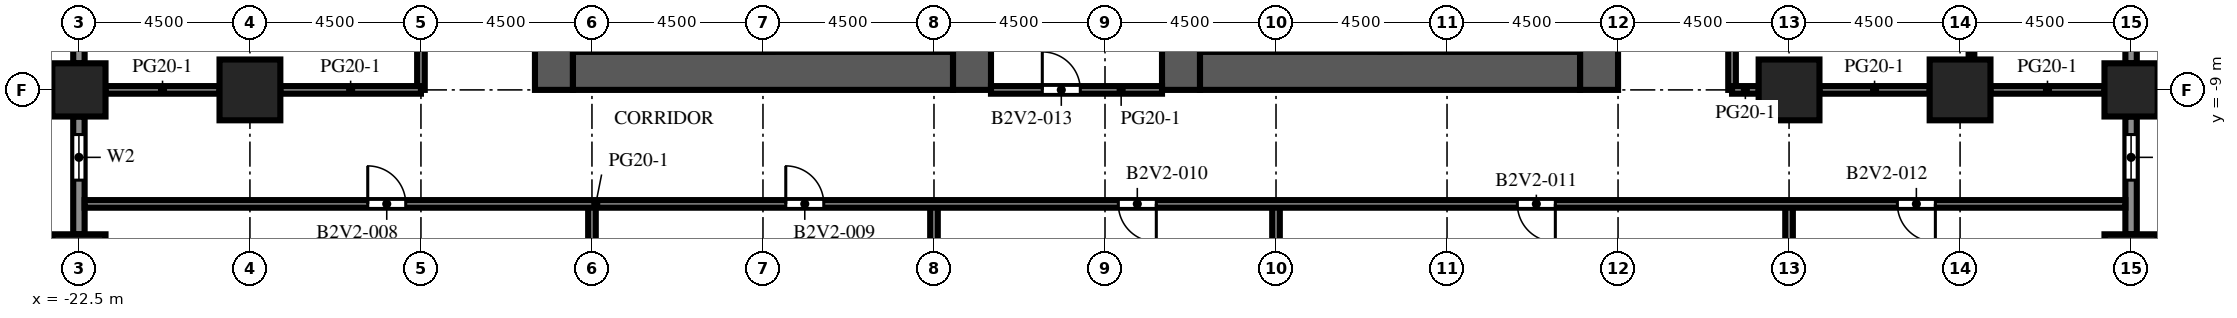
"""IFC4 building model, lengths in metres.
Left out: names, types, materials, properties, quantities, classifications, styles, units other than length and angle.
Written with IfcOpenShell. Run it as: python <this file> out.ifc"""

import sys

from ifc_helpers import new_model, si_unit, direction, frame, frame_2d, origin, origin_2d, place, context, subcontext, project, spatial, rectangle, extrude, element, fill, save


model = new_model("IFC4")
c1 = context("Model", 3, precision=1e-05, world=origin(), true_north=direction((0.0, 1.0)))
c2 = subcontext(c1, "Body", "Model", "MODEL_VIEW")
j1 = project(units=[si_unit("LENGTHUNIT", "METRE"), si_unit("PLANEANGLEUNIT", "RADIAN")], contexts=[c1])
p1 = place(None, origin())
s1 = spatial("IfcSite", under=j1, at=p1, CompositionType="ELEMENT")
p2 = place(p1, origin())
s2 = spatial("IfcBuilding", under=s1, at=p2, CompositionType="ELEMENT")
p3 = place(p2, frame((0.0, 0.0, 62.4)))
s3 = spatial("IfcBuildingStorey", under=s2, at=p3, CompositionType="ELEMENT", Elevation=62.4)
for number, where, z_axis, x_axis in (
    (1, (-22.5, -13.5, 0.0), (0.0, 0.0, 1.0), (1.0, 0.0, 0.0)),
    (2, (-22.5, -9.0, 0.0), (0.0, 0.0, 1.0), (1.0, 0.0, 0.0)),
    (3, (31.5, -13.5, 0.0), (0.0, 0.0, 1.0), (1.0, 0.0, 0.0)),
    (4, (31.5, -9.0, 0.0), (0.0, 0.0, 1.0), (1.0, 0.0, 0.0)),
):
    element("IfcColumn", number, at=place(p3, frame(where, z_axis=z_axis, x_axis=x_axis)), inside=s3, PredefinedType="COLUMN", context=c2, shape_type="SweptSolid", body=[
        extrude(rectangle(XDim=1.4, YDim=1.4, at=origin_2d()), origin(), (0.0, 0.0, 1.0), 4.1),
    ])
for number, where, z_axis, x_axis in (
    (5, (-18.0, -9.0, 0.0), (0.0, 0.0, 1.0), (1.0, 0.0, 0.0)),
    (6, (22.5, -9.0, 0.0), (0.0, 0.0, 1.0), (1.0, 0.0, 0.0)),
    (7, (27.0, -9.0, 0.0), (0.0, 0.0, 1.0), (1.0, 0.0, 0.0)),
):
    element("IfcColumn", number, at=place(p3, frame(where, z_axis=z_axis, x_axis=x_axis)), inside=s3, PredefinedType="COLUMN", context=c2, shape_type="SweptSolid", body=[
        extrude(rectangle(XDim=1.6, YDim=1.6, at=origin_2d()), origin(), (0.0, 0.0, 1.0), 4.1),
    ])
p4 = place(p3, frame((-10.0, -9.0, 0.0), z_axis=(0.0, 0.0, 1.0), x_axis=(0.0, 1.0, 0.0)))
e8 = element("IfcWall", 8, at=p4, inside=s3, PredefinedType="SHEAR", context=c2, shape_type="SweptSolid", body=[
    extrude(rectangle(XDim=27.5, YDim=1.0, at=frame_2d((13.75, 0.0))), origin(), (0.0, 0.0, 1.0), 4.1),
])
p5 = place(p4, frame((12.55, 0.0, 0.0)))
e9 = element("IfcOpeningElement", 9, at=p5, cuts=e8, PredefinedType="OPENING", context=c2, shape_type="SweptSolid", body=[
    extrude(rectangle(XDim=2.4, YDim=2.4, at=frame_2d((1.2, 1.2))), frame((0.0, 0.51, 0.0), z_axis=(0.0, -1.0, 0.0), x_axis=(1.0, 0.0, 0.0)), (0.0, 0.0, 1.0), 1.02),
])
p6 = place(p4, frame((6.825, 0.0, 0.0)))
e10 = element("IfcOpeningElement", 10, at=p6, cuts=e8, PredefinedType="OPENING", context=c2, shape_type="SweptSolid", body=[
    extrude(rectangle(XDim=1.2, YDim=2.1, at=frame_2d((0.6, 1.05))), frame((0.0, 0.51, 0.0), z_axis=(0.0, -1.0, 0.0), x_axis=(1.0, 0.0, 0.0)), (0.0, 0.0, 1.0), 1.02),
])
p7 = place(p4, frame((19.475, 0.0, 0.0)))
e11 = element("IfcOpeningElement", 11, at=p7, cuts=e8, PredefinedType="OPENING", context=c2, shape_type="SweptSolid", body=[
    extrude(rectangle(XDim=1.2, YDim=2.1, at=frame_2d((0.6, 1.05))), frame((0.0, 0.51, 0.0), z_axis=(0.0, -1.0, 0.0), x_axis=(1.0, 0.0, 0.0)), (0.0, 0.0, 1.0), 1.02),
])
p8 = place(p3, frame((1.0, -9.0, 0.0), z_axis=(0.0, 0.0, 1.0), x_axis=(0.0, 1.0, 0.0)))
e12 = element("IfcWall", 12, at=p8, inside=s3, PredefinedType="SHEAR", context=c2, shape_type="SweptSolid", body=[
    extrude(rectangle(XDim=27.5, YDim=1.0, at=frame_2d((13.75, 0.0))), origin(), (0.0, 0.0, 1.0), 4.1),
])
p9 = place(p8, frame((12.55, 0.0, 0.0)))
e13 = element("IfcOpeningElement", 13, at=p9, cuts=e12, PredefinedType="OPENING", context=c2, shape_type="SweptSolid", body=[
    extrude(rectangle(XDim=2.4, YDim=2.4, at=frame_2d((1.2, 1.2))), frame((0.0, 0.51, 0.0), z_axis=(0.0, -1.0, 0.0), x_axis=(1.0, 0.0, 0.0)), (0.0, 0.0, 1.0), 1.02),
])
p10 = place(p8, frame((5.55, 0.0, 0.0)))
e14 = element("IfcOpeningElement", 14, at=p10, cuts=e12, PredefinedType="OPENING", context=c2, shape_type="SweptSolid", body=[
    extrude(rectangle(XDim=0.905, YDim=2.1, at=frame_2d((0.453, 1.05))), frame((0.0, 0.51, 0.0), z_axis=(0.0, -1.0, 0.0), x_axis=(1.0, 0.0, 0.0)), (0.0, 0.0, 1.0), 1.02),
])
p11 = place(p8, frame((23.363, 0.0, 0.0)))
e15 = element("IfcOpeningElement", 15, at=p11, cuts=e12, PredefinedType="OPENING", context=c2, shape_type="SweptSolid", body=[
    extrude(rectangle(XDim=1.2, YDim=2.1, at=frame_2d((0.6, 1.05))), frame((0.0, 0.51, 0.0), z_axis=(0.0, -1.0, 0.0), x_axis=(1.0, 0.0, 0.0)), (0.0, 0.0, 1.0), 1.02),
])
p12 = place(p3, frame((-9.5, -8.5, 0.0), z_axis=(0.0, 0.0, 1.0), x_axis=(1.0, 0.0, 0.0)))
e16 = element("IfcWall", 16, at=p12, inside=s3, PredefinedType="SHEAR", context=c2, shape_type="SweptSolid", body=[
    extrude(rectangle(XDim=10.0, YDim=1.0, at=frame_2d((5.0, 0.0))), origin(), (0.0, 0.0, 1.0), 4.1),
])
p13 = place(p3, frame((6.5, -9.0, 0.0), z_axis=(0.0, 0.0, 1.0), x_axis=(0.0, 1.0, 0.0)))
e17 = element("IfcWall", 17, at=p13, inside=s3, PredefinedType="SHEAR", context=c2, shape_type="SweptSolid", body=[
    extrude(rectangle(XDim=27.5, YDim=1.0, at=frame_2d((13.75, 0.0))), origin(), (0.0, 0.0, 1.0), 4.1),
])
p14 = place(p13, frame((12.55, 0.0, 0.0)))
e18 = element("IfcOpeningElement", 18, at=p14, cuts=e17, PredefinedType="OPENING", context=c2, shape_type="SweptSolid", body=[
    extrude(rectangle(XDim=2.4, YDim=2.4, at=frame_2d((1.2, 1.2))), frame((0.0, 0.51, 0.0), z_axis=(0.0, -1.0, 0.0), x_axis=(1.0, 0.0, 0.0)), (0.0, 0.0, 1.0), 1.02),
])
p15 = place(p13, frame((5.55, 0.0, 0.0)))
e19 = element("IfcOpeningElement", 19, at=p15, cuts=e17, PredefinedType="OPENING", context=c2, shape_type="SweptSolid", body=[
    extrude(rectangle(XDim=0.905, YDim=2.1, at=frame_2d((0.453, 1.05))), frame((0.0, 0.51, 0.0), z_axis=(0.0, -1.0, 0.0), x_axis=(1.0, 0.0, 0.0)), (0.0, 0.0, 1.0), 1.02),
])
p16 = place(p13, frame((23.363, 0.0, 0.0)))
e20 = element("IfcOpeningElement", 20, at=p16, cuts=e17, PredefinedType="OPENING", context=c2, shape_type="SweptSolid", body=[
    extrude(rectangle(XDim=1.2, YDim=2.1, at=frame_2d((0.6, 1.05))), frame((0.0, 0.51, 0.0), z_axis=(0.0, -1.0, 0.0), x_axis=(1.0, 0.0, 0.0)), (0.0, 0.0, 1.0), 1.02),
])
p17 = place(p3, frame((17.5, -9.0, 0.0), z_axis=(0.0, 0.0, 1.0), x_axis=(0.0, 1.0, 0.0)))
e21 = element("IfcWall", 21, at=p17, inside=s3, PredefinedType="SHEAR", context=c2, shape_type="SweptSolid", body=[
    extrude(rectangle(XDim=27.5, YDim=1.0, at=frame_2d((13.75, 0.0))), origin(), (0.0, 0.0, 1.0), 4.1),
])
p18 = place(p17, frame((12.55, 0.0, 0.0)))
e22 = element("IfcOpeningElement", 22, at=p18, cuts=e21, PredefinedType="OPENING", context=c2, shape_type="SweptSolid", body=[
    extrude(rectangle(XDim=2.4, YDim=2.4, at=frame_2d((1.2, 1.2))), frame((0.0, 0.51, 0.0), z_axis=(0.0, -1.0, 0.0), x_axis=(1.0, 0.0, 0.0)), (0.0, 0.0, 1.0), 1.02),
])
p19 = place(p17, frame((6.825, 0.0, 0.0)))
e23 = element("IfcOpeningElement", 23, at=p19, cuts=e21, PredefinedType="OPENING", context=c2, shape_type="SweptSolid", body=[
    extrude(rectangle(XDim=1.2, YDim=2.1, at=frame_2d((0.6, 1.05))), frame((0.0, 0.51, 0.0), z_axis=(0.0, -1.0, 0.0), x_axis=(1.0, 0.0, 0.0)), (0.0, 0.0, 1.0), 1.02),
])
p20 = place(p17, frame((19.475, 0.0, 0.0)))
e24 = element("IfcOpeningElement", 24, at=p20, cuts=e21, PredefinedType="OPENING", context=c2, shape_type="SweptSolid", body=[
    extrude(rectangle(XDim=1.2, YDim=2.1, at=frame_2d((0.6, 1.05))), frame((0.0, 0.51, 0.0), z_axis=(0.0, -1.0, 0.0), x_axis=(1.0, 0.0, 0.0)), (0.0, 0.0, 1.0), 1.02),
])
p21 = place(p3, frame((7.0, -8.5, 0.0), z_axis=(0.0, 0.0, 1.0), x_axis=(1.0, 0.0, 0.0)))
e25 = element("IfcWall", 25, at=p21, inside=s3, PredefinedType="SHEAR", context=c2, shape_type="SweptSolid", body=[
    extrude(rectangle(XDim=10.0, YDim=1.0, at=frame_2d((5.0, 0.0))), origin(), (0.0, 0.0, 1.0), 4.1),
])
p22 = place(p3, frame((31.5, -9.7, 0.0), z_axis=(0.0, 0.0, 1.0), x_axis=(0.0, -1.0, 0.0)))
e26 = element("IfcWall", 26, at=p22, inside=s3, PredefinedType="SOLIDWALL", context=c2, shape_type="SweptSolid", body=[
    extrude(rectangle(XDim=3.1, YDim=0.3, at=frame_2d((1.55, 0.0))), origin(), (0.0, 0.0, 1.0), 2.75),
])
p23 = place(p22, frame((0.475, 0.0, 0.8)))
e27 = element("IfcOpeningElement", 27, at=p23, cuts=e26, PredefinedType="OPENING", context=c2, shape_type="SweptSolid", body=[
    extrude(rectangle(XDim=1.2, YDim=1.7, at=frame_2d((0.6, 0.85))), frame((0.0, 0.16, 0.0), z_axis=(0.0, -1.0, 0.0), x_axis=(1.0, 0.0, 0.0)), (0.0, 0.0, 1.0), 0.32),
])
p24 = place(p3, frame((31.5, -5.2, 0.0), z_axis=(0.0, 0.0, 1.0), x_axis=(0.0, -1.0, 0.0)))
e28 = element("IfcWall", 28, at=p24, inside=s3, PredefinedType="SOLIDWALL", context=c2, shape_type="SweptSolid", body=[
    extrude(rectangle(XDim=3.1, YDim=0.3, at=frame_2d((1.55, 0.0))), origin(), (0.0, 0.0, 1.0), 2.75),
])
p25 = place(p24, frame((0.35, 0.0, 0.8)))
e29 = element("IfcOpeningElement", 29, at=p25, cuts=e28, PredefinedType="OPENING", context=c2, shape_type="SweptSolid", body=[
    extrude(rectangle(XDim=2.4, YDim=1.7, at=frame_2d((1.2, 0.85))), frame((0.0, 0.16, 0.0), z_axis=(0.0, -1.0, 0.0), x_axis=(1.0, 0.0, 0.0)), (0.0, 0.0, 1.0), 0.32),
])
p26 = place(p3, frame((-22.5, -8.3, 0.0), z_axis=(0.0, 0.0, 1.0), x_axis=(0.0, 1.0, 0.0)))
e30 = element("IfcWall", 30, at=p26, inside=s3, PredefinedType="SOLIDWALL", context=c2, shape_type="SweptSolid", body=[
    extrude(rectangle(XDim=3.1, YDim=0.3, at=frame_2d((1.55, 0.0))), origin(), (0.0, 0.0, 1.0), 2.75),
])
p27 = place(p26, frame((0.35, 0.0, 0.8)))
e31 = element("IfcOpeningElement", 31, at=p27, cuts=e30, PredefinedType="OPENING", context=c2, shape_type="SweptSolid", body=[
    extrude(rectangle(XDim=2.4, YDim=1.7, at=frame_2d((1.2, 0.85))), frame((0.0, 0.16, 0.0), z_axis=(0.0, -1.0, 0.0), x_axis=(1.0, 0.0, 0.0)), (0.0, 0.0, 1.0), 0.32),
])
p28 = place(p3, frame((-22.5, -12.8, 0.0), z_axis=(0.0, 0.0, 1.0), x_axis=(0.0, 1.0, 0.0)))
e32 = element("IfcWall", 32, at=p28, inside=s3, PredefinedType="SOLIDWALL", context=c2, shape_type="SweptSolid", body=[
    extrude(rectangle(XDim=3.1, YDim=0.3, at=frame_2d((1.55, 0.0))), origin(), (0.0, 0.0, 1.0), 2.75),
])
p29 = place(p28, frame((1.425, 0.0, 0.8)))
e33 = element("IfcOpeningElement", 33, at=p29, cuts=e32, PredefinedType="OPENING", context=c2, shape_type="SweptSolid", body=[
    extrude(rectangle(XDim=1.2, YDim=1.7, at=frame_2d((0.6, 0.85))), frame((0.0, 0.16, 0.0), z_axis=(0.0, -1.0, 0.0), x_axis=(1.0, 0.0, 0.0)), (0.0, 0.0, 1.0), 0.32),
])
p30 = place(p3, frame((-13.5, -9.0, 0.0), z_axis=(0.0, 0.0, 1.0), x_axis=(0.0, 1.0, 0.0)))
e34 = element("IfcWall", 34, at=p30, inside=s3, PredefinedType="PARTITIONING", context=c2, shape_type="SweptSolid", body=[
    extrude(rectangle(XDim=27.5, YDim=0.2, at=frame_2d((13.75, 0.0))), origin(), (0.0, 0.0, 1.0), 3.65),
])
p31 = place(p30, frame((4.85, 0.0, 0.0)))
e35 = element("IfcOpeningElement", 35, at=p31, cuts=e34, PredefinedType="OPENING", context=c2, shape_type="SweptSolid", body=[
    extrude(rectangle(XDim=1.0, YDim=2.1, at=frame_2d((0.5, 1.05))), frame((0.0, 0.11, 0.0), z_axis=(0.0, -1.0, 0.0), x_axis=(1.0, 0.0, 0.0)), (0.0, 0.0, 1.0), 0.22),
])
p32 = place(p30, frame((16.35, 0.0, 0.0)))
e36 = element("IfcOpeningElement", 36, at=p32, cuts=e34, PredefinedType="OPENING", context=c2, shape_type="SweptSolid", body=[
    extrude(rectangle(XDim=1.0, YDim=2.1, at=frame_2d((0.5, 1.05))), frame((0.0, 0.11, 0.0), z_axis=(0.0, -1.0, 0.0), x_axis=(1.0, 0.0, 0.0)), (0.0, 0.0, 1.0), 0.22),
])
for number, where, z_axis, x_axis in (
    (37, (-9.0, -17.2, 0.0), (0.0, 0.0, 1.0), (0.0, 1.0, 0.0)),
    (38, (0.0, -17.2, 0.0), (0.0, 0.0, 1.0), (0.0, 1.0, 0.0)),
    (39, (9.0, -17.2, 0.0), (0.0, 0.0, 1.0), (0.0, 1.0, 0.0)),
):
    element("IfcWall", number, at=place(p3, frame(where, z_axis=z_axis, x_axis=x_axis)), inside=s3, PredefinedType="PARTITIONING", context=c2, shape_type="SweptSolid", body=[
        extrude(rectangle(XDim=5.2, YDim=0.2, at=frame_2d((2.6, 0.0))), origin(), (0.0, 0.0, 1.0), 3.65),
    ])
p33 = place(p3, frame((21.0, 18.5, 0.0), z_axis=(0.0, 0.0, 1.0), x_axis=(0.0, -1.0, 0.0)))
e40 = element("IfcWall", 40, at=p33, inside=s3, PredefinedType="PARTITIONING", context=c2, shape_type="SweptSolid", body=[
    extrude(rectangle(XDim=27.5, YDim=0.2, at=frame_2d((13.75, 0.0))), origin(), (0.0, 0.0, 1.0), 3.65),
])
p34 = place(p33, frame((19.4, 0.0, 0.0)))
e41 = element("IfcOpeningElement", 41, at=p34, cuts=e40, PredefinedType="OPENING", context=c2, shape_type="SweptSolid", body=[
    extrude(rectangle(XDim=1.0, YDim=2.1, at=frame_2d((0.5, 1.05))), frame((0.0, 0.11, 0.0), z_axis=(0.0, -1.0, 0.0), x_axis=(1.0, 0.0, 0.0)), (0.0, 0.0, 1.0), 0.22),
])
p35 = place(p33, frame((7.65, 0.0, 0.0)))
e42 = element("IfcOpeningElement", 42, at=p35, cuts=e40, PredefinedType="OPENING", context=c2, shape_type="SweptSolid", body=[
    extrude(rectangle(XDim=1.0, YDim=2.1, at=frame_2d((0.5, 1.05))), frame((0.0, 0.11, 0.0), z_axis=(0.0, -1.0, 0.0), x_axis=(1.0, 0.0, 0.0)), (0.0, 0.0, 1.0), 0.22),
])
p36 = place(p3, frame((22.5, -17.2, 0.0), z_axis=(0.0, 0.0, 1.0), x_axis=(0.0, 1.0, 0.0)))
e43 = element("IfcWall", 43, at=p36, inside=s3, PredefinedType="PARTITIONING", context=c2, shape_type="SweptSolid", body=[
    extrude(rectangle(XDim=5.2, YDim=0.2, at=frame_2d((2.6, 0.0))), origin(), (0.0, 0.0, 1.0), 3.65),
])
p37 = place(p3, frame((27.3, -0.8, 0.0), z_axis=(0.0, 0.0, 1.0), x_axis=(0.0, -1.0, 0.0)))
e44 = element("IfcWall", 44, at=p37, inside=s3, PredefinedType="PARTITIONING", context=c2, shape_type="SweptSolid", body=[
    extrude(rectangle(XDim=7.4, YDim=0.15, at=frame_2d((3.7, 0.0))), origin(), (0.0, 0.0, 1.0), 3.65),
])
p38 = place(p37, frame((0.1, 0.0, 0.0)))
e45 = element("IfcOpeningElement", 45, at=p38, cuts=e44, PredefinedType="OPENING", context=c2, shape_type="SweptSolid", body=[
    extrude(rectangle(XDim=1.0, YDim=2.1, at=frame_2d((0.5, 1.05))), frame((0.0, 0.085, 0.0), z_axis=(0.0, -1.0, 0.0), x_axis=(1.0, 0.0, 0.0)), (0.0, 0.0, 1.0), 0.17),
])
p39 = place(p3, frame((31.35, -12.0, 0.0), z_axis=(0.0, 0.0, 1.0), x_axis=(-1.0, 0.0, 0.0)))
e46 = element("IfcWall", 46, at=p39, inside=s3, PredefinedType="PARTITIONING", context=c2, shape_type="SweptSolid", body=[
    extrude(rectangle(XDim=53.7, YDim=0.2, at=frame_2d((26.85, 0.0))), origin(), (0.0, 0.0, 1.0), 3.65),
])
p40 = place(p39, frame((45.25, 0.0, 0.0)))
e47 = element("IfcOpeningElement", 47, at=p40, cuts=e46, PredefinedType="OPENING", context=c2, shape_type="SweptSolid", body=[
    extrude(rectangle(XDim=1.0, YDim=2.1, at=frame_2d((0.5, 1.05))), frame((0.0, 0.11, 0.0), z_axis=(0.0, -1.0, 0.0), x_axis=(1.0, 0.0, 0.0)), (0.0, 0.0, 1.0), 0.22),
])
p41 = place(p39, frame((34.25, 0.0, 0.0)))
e48 = element("IfcOpeningElement", 48, at=p41, cuts=e46, PredefinedType="OPENING", context=c2, shape_type="SweptSolid", body=[
    extrude(rectangle(XDim=1.0, YDim=2.1, at=frame_2d((0.5, 1.05))), frame((0.0, 0.11, 0.0), z_axis=(0.0, -1.0, 0.0), x_axis=(1.0, 0.0, 0.0)), (0.0, 0.0, 1.0), 0.22),
])
p42 = place(p39, frame((25.5, 0.0, 0.0)))
e49 = element("IfcOpeningElement", 49, at=p42, cuts=e46, PredefinedType="OPENING", context=c2, shape_type="SweptSolid", body=[
    extrude(rectangle(XDim=1.0, YDim=2.1, at=frame_2d((0.5, 1.05))), frame((0.0, 0.11, 0.0), z_axis=(0.0, -1.0, 0.0), x_axis=(1.0, 0.0, 0.0)), (0.0, 0.0, 1.0), 0.22),
])
p43 = place(p39, frame((15.0, 0.0, 0.0)))
e50 = element("IfcOpeningElement", 50, at=p43, cuts=e46, PredefinedType="OPENING", context=c2, shape_type="SweptSolid", body=[
    extrude(rectangle(XDim=1.0, YDim=2.1, at=frame_2d((0.5, 1.05))), frame((0.0, 0.11, 0.0), z_axis=(0.0, -1.0, 0.0), x_axis=(1.0, 0.0, 0.0)), (0.0, 0.0, 1.0), 0.22),
])
p44 = place(p39, frame((5.0, 0.0, 0.0)))
e51 = element("IfcOpeningElement", 51, at=p44, cuts=e46, PredefinedType="OPENING", context=c2, shape_type="SweptSolid", body=[
    extrude(rectangle(XDim=1.0, YDim=2.1, at=frame_2d((0.5, 1.05))), frame((0.0, 0.11, 0.0), z_axis=(0.0, -1.0, 0.0), x_axis=(1.0, 0.0, 0.0)), (0.0, 0.0, 1.0), 0.22),
])
p45 = place(p3, frame((-21.8, -9.0, 0.0), z_axis=(0.0, 0.0, 1.0), x_axis=(1.0, 0.0, 0.0)))
e52 = element("IfcWall", 52, at=p45, inside=s3, PredefinedType="PARTITIONING", context=c2, shape_type="SweptSolid", body=[
    extrude(rectangle(XDim=3.0, YDim=0.2, at=frame_2d((1.5, 0.0))), origin(), (0.0, 0.0, 1.0), 3.65),
])
p46 = place(p3, frame((-17.2, -9.0, 0.0), z_axis=(0.0, 0.0, 1.0), x_axis=(1.0, 0.0, 0.0)))
e53 = element("IfcWall", 53, at=p46, inside=s3, PredefinedType="PARTITIONING", context=c2, shape_type="SweptSolid", body=[
    extrude(rectangle(XDim=3.7, YDim=0.2, at=frame_2d((1.85, 0.0))), origin(), (0.0, 0.0, 1.0), 3.65),
])
p47 = place(p3, frame((1.5, -9.0, 0.0), z_axis=(0.0, 0.0, 1.0), x_axis=(1.0, 0.0, 0.0)))
e54 = element("IfcWall", 54, at=p47, inside=s3, PredefinedType="PARTITIONING", context=c2, shape_type="SweptSolid", body=[
    extrude(rectangle(XDim=4.5, YDim=0.2, at=frame_2d((2.25, 0.0))), origin(), (0.0, 0.0, 1.0), 3.65),
])
p48 = place(p47, frame((1.35, 0.0, 0.0)))
e55 = element("IfcOpeningElement", 55, at=p48, cuts=e54, PredefinedType="OPENING", context=c2, shape_type="SweptSolid", body=[
    extrude(rectangle(XDim=1.0, YDim=2.1, at=frame_2d((0.5, 1.05))), frame((0.0, 0.11, 0.0), z_axis=(0.0, -1.0, 0.0), x_axis=(1.0, 0.0, 0.0)), (0.0, 0.0, 1.0), 0.22),
])
p49 = place(p3, frame((21.0, -9.0, 0.0), z_axis=(0.0, 0.0, 1.0), x_axis=(1.0, 0.0, 0.0)))
e56 = element("IfcWall", 56, at=p49, inside=s3, PredefinedType="PARTITIONING", context=c2, shape_type="SweptSolid", body=[
    extrude(rectangle(XDim=0.7, YDim=0.2, at=frame_2d((0.35, 0.0))), origin(), (0.0, 0.0, 1.0), 3.65),
])
p50 = place(p3, frame((23.3, -9.0, 0.0), z_axis=(0.0, 0.0, 1.0), x_axis=(1.0, 0.0, 0.0)))
e57 = element("IfcWall", 57, at=p50, inside=s3, PredefinedType="PARTITIONING", context=c2, shape_type="SweptSolid", body=[
    extrude(rectangle(XDim=2.9, YDim=0.2, at=frame_2d((1.45, 0.0))), origin(), (0.0, 0.0, 1.0), 3.65),
])
p51 = place(p3, frame((27.8, -9.0, 0.0), z_axis=(0.0, 0.0, 1.0), x_axis=(1.0, 0.0, 0.0)))
e58 = element("IfcWall", 58, at=p51, inside=s3, PredefinedType="PARTITIONING", context=c2, shape_type="SweptSolid", body=[
    extrude(rectangle(XDim=3.0, YDim=0.2, at=frame_2d((1.5, 0.0))), origin(), (0.0, 0.0, 1.0), 3.65),
])
p52 = place(p23, origin())
e59 = element("IfcWindow", 59, at=p52, inside=s3, PartitioningType="SINGLE_PANEL", PredefinedType="WINDOW", context=c2, shape_type="SweptSolid", body=[
    extrude(rectangle(XDim=1.2, YDim=1.7, at=frame_2d((0.6, 0.85))), frame((0.0, 0.03, 0.0), z_axis=(0.0, -1.0, 0.0), x_axis=(1.0, 0.0, 0.0)), (0.0, 0.0, 1.0), 0.06),
])
fill(e27, e59)
p53 = place(p29, origin())
e60 = element("IfcWindow", 60, at=p53, inside=s3, PartitioningType="SINGLE_PANEL", PredefinedType="WINDOW", context=c2, shape_type="SweptSolid", body=[
    extrude(rectangle(XDim=1.2, YDim=1.7, at=frame_2d((0.6, 0.85))), frame((0.0, 0.03, 0.0), z_axis=(0.0, -1.0, 0.0), x_axis=(1.0, 0.0, 0.0)), (0.0, 0.0, 1.0), 0.06),
])
fill(e33, e60)
p54 = place(p40, origin())
e61 = element("IfcDoor", 61, at=p54, inside=s3, OperationType="SINGLE_SWING_RIGHT", PredefinedType="DOOR", context=c2, shape_type="SweptSolid", body=[
    extrude(rectangle(XDim=1.0, YDim=2.1, at=frame_2d((0.5, 1.05))), frame((0.0, 0.025, 0.0), z_axis=(0.0, -1.0, 0.0), x_axis=(1.0, 0.0, 0.0)), (0.0, 0.0, 1.0), 0.05),
])
fill(e47, e61)
p55 = place(p41, origin())
e62 = element("IfcDoor", 62, at=p55, inside=s3, OperationType="SINGLE_SWING_RIGHT", PredefinedType="DOOR", context=c2, shape_type="SweptSolid", body=[
    extrude(rectangle(XDim=1.0, YDim=2.1, at=frame_2d((0.5, 1.05))), frame((0.0, 0.025, 0.0), z_axis=(0.0, -1.0, 0.0), x_axis=(1.0, 0.0, 0.0)), (0.0, 0.0, 1.0), 0.05),
])
fill(e48, e62)
p56 = place(p42, origin())
e63 = element("IfcDoor", 63, at=p56, inside=s3, OperationType="SINGLE_SWING_LEFT", PredefinedType="DOOR", context=c2, shape_type="SweptSolid", body=[
    extrude(rectangle(XDim=1.0, YDim=2.1, at=frame_2d((0.5, 1.05))), frame((0.0, 0.025, 0.0), z_axis=(0.0, -1.0, 0.0), x_axis=(1.0, 0.0, 0.0)), (0.0, 0.0, 1.0), 0.05),
])
fill(e49, e63)
p57 = place(p43, origin())
e64 = element("IfcDoor", 64, at=p57, inside=s3, OperationType="SINGLE_SWING_LEFT", PredefinedType="DOOR", context=c2, shape_type="SweptSolid", body=[
    extrude(rectangle(XDim=1.0, YDim=2.1, at=frame_2d((0.5, 1.05))), frame((0.0, 0.025, 0.0), z_axis=(0.0, -1.0, 0.0), x_axis=(1.0, 0.0, 0.0)), (0.0, 0.0, 1.0), 0.05),
])
fill(e50, e64)
p58 = place(p44, origin())
e65 = element("IfcDoor", 65, at=p58, inside=s3, OperationType="SINGLE_SWING_LEFT", PredefinedType="DOOR", context=c2, shape_type="SweptSolid", body=[
    extrude(rectangle(XDim=1.0, YDim=2.1, at=frame_2d((0.5, 1.05))), frame((0.0, 0.025, 0.0), z_axis=(0.0, -1.0, 0.0), x_axis=(1.0, 0.0, 0.0)), (0.0, 0.0, 1.0), 0.05),
])
fill(e51, e65)
p59 = place(p48, origin())
e66 = element("IfcDoor", 66, at=p59, inside=s3, OperationType="SINGLE_SWING_LEFT", PredefinedType="DOOR", context=c2, shape_type="SweptSolid", body=[
    extrude(rectangle(XDim=1.0, YDim=2.1, at=frame_2d((0.5, 1.05))), frame((0.0, 0.025, 0.0), z_axis=(0.0, -1.0, 0.0), x_axis=(1.0, 0.0, 0.0)), (0.0, 0.0, 1.0), 0.05),
])
fill(e55, e66)
save(model, sys.argv[1])
